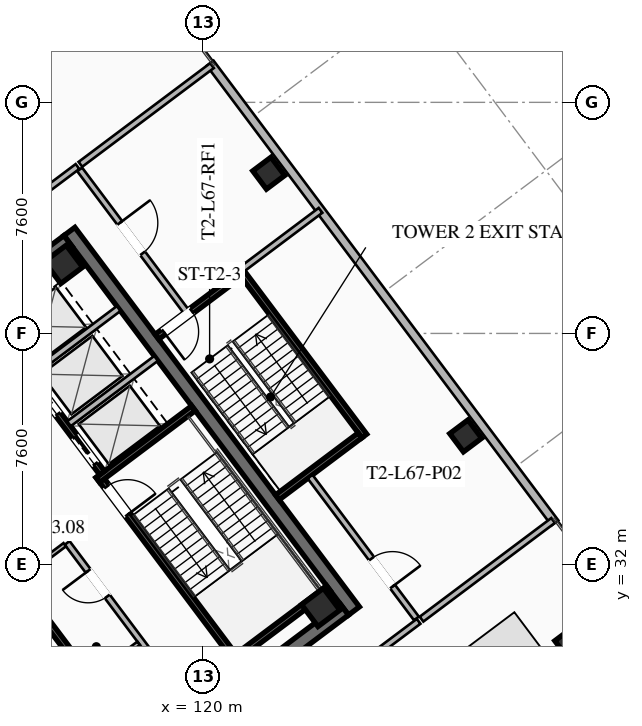
"""IFC4 building model, lengths in metres.
Left out: names, types, materials, properties, quantities, classifications, styles, units other than length and angle.
Written with IfcOpenShell. Run it as: python <this file> out.ifc"""

import sys

from ifc_helpers import new_model, si_unit, direction, frame, frame_2d, origin, origin_2d, place, context, subcontext, project, spatial, rectangle, hollow_rectangle, extrude, element, fill, save


model = new_model("IFC4")
c1 = context("Model", 3, precision=1e-05, world=origin(), true_north=direction((0.0, 1.0)))
c2 = subcontext(c1, "Body", "Model", "MODEL_VIEW")
j1 = project(units=[si_unit("LENGTHUNIT", "METRE"), si_unit("PLANEANGLEUNIT", "RADIAN")], contexts=[c1])
p1 = place(None, origin())
s1 = spatial("IfcSite", under=j1, at=p1, CompositionType="ELEMENT")
p2 = place(p1, origin())
s2 = spatial("IfcBuilding", under=s1, at=p2, CompositionType="ELEMENT")
p3 = place(p2, frame((0.0, 0.0, 246.8)))
s3 = spatial("IfcBuildingStorey", under=s2, at=p3, CompositionType="ELEMENT", Elevation=246.8)
p4 = place(p3, frame((115.604, 42.953, 0.0), z_axis=(0.0, 0.0, 1.0), x_axis=(0.600005007985, -0.799996243986, 0.0)))
e1 = element("IfcWall", 1, at=p4, inside=s3, PredefinedType="SHEAR", context=c2, shape_type="SweptSolid", body=[
    extrude(rectangle(XDim=15.6, YDim=0.45, at=frame_2d((7.8, 0.0))), origin(), (0.0, 0.0, 1.0), 4.6),
])
p5 = place(p3, frame((124.649, 30.518, 0.0), z_axis=(0.0, 0.0, 1.0), x_axis=(-0.8, -0.6, 0.0)))
e2 = element("IfcWall", 2, at=p5, inside=s3, PredefinedType="SHEAR", context=c2, shape_type="SweptSolid", body=[
    extrude(rectangle(XDim=15.26, YDim=0.45, at=frame_2d((7.63, 0.0))), origin(), (0.0, 0.0, 1.0), 4.6),
])
p6 = place(p5, frame((9.33, 0.0, 0.0)))
e3 = element("IfcOpeningElement", 3, at=p6, cuts=e2, PredefinedType="OPENING", context=c2, shape_type="SweptSolid", body=[
    extrude(rectangle(XDim=1.25, YDim=2.25, at=frame_2d((0.625, 1.125))), frame((0.0, 0.235, 0.0), z_axis=(0.0, -1.0, 0.0), x_axis=(1.0, 0.0, 0.0)), (0.0, 0.0, 1.0), 0.47),
])
p7 = place(p5, frame((4.28, 0.0, 0.0)))
e4 = element("IfcOpeningElement", 4, at=p7, cuts=e2, PredefinedType="OPENING", context=c2, shape_type="SweptSolid", body=[
    extrude(rectangle(XDim=1.25, YDim=2.25, at=frame_2d((0.625, 1.125))), frame((0.0, 0.235, 0.0), z_axis=(0.0, -1.0, 0.0), x_axis=(1.0, 0.0, 0.0)), (0.0, 0.0, 1.0), 0.47),
])
p8 = place(p3, frame((103.351, 33.482, 0.0), z_axis=(0.0, 0.0, 1.0), x_axis=(0.8, 0.6, 0.0)))
e5 = element("IfcWall", 5, at=p8, inside=s3, PredefinedType="SHEAR", context=c2, shape_type="SweptSolid", body=[
    extrude(rectangle(XDim=15.26, YDim=0.45, at=frame_2d((7.63, 0.0))), origin(), (0.0, 0.0, 1.0), 4.6),
])
p9 = place(p8, frame((4.68, 0.0, 0.0)))
e6 = element("IfcOpeningElement", 6, at=p9, cuts=e5, PredefinedType="OPENING", context=c2, shape_type="SweptSolid", body=[
    extrude(rectangle(XDim=1.25, YDim=2.25, at=frame_2d((0.625, 1.125))), frame((0.0, 0.235, 0.0), z_axis=(0.0, -1.0, 0.0), x_axis=(1.0, 0.0, 0.0)), (0.0, 0.0, 1.0), 0.47),
])
p10 = place(p8, frame((9.73, 0.0, 0.0)))
e7 = element("IfcOpeningElement", 7, at=p10, cuts=e5, PredefinedType="OPENING", context=c2, shape_type="SweptSolid", body=[
    extrude(rectangle(XDim=1.25, YDim=2.25, at=frame_2d((0.625, 1.125))), frame((0.0, 0.235, 0.0), z_axis=(0.0, -1.0, 0.0), x_axis=(1.0, 0.0, 0.0)), (0.0, 0.0, 1.0), 0.47),
])
for number, where, z_axis, x_axis in (
    (8, (123.87, 30.59, 0.0), (0.0, 0.0, 1.0), (0.8, 0.6, 0.0)),
    (9, (115.41, 41.87, 0.0), (0.0, 0.0, 1.0), (0.8, 0.6, 0.0)),
    (10, (132.2, 29.4, 0.0), (0.0, 0.0, 1.0), (0.8, 0.6, 0.0)),
):
    element("IfcColumn", number, at=place(p3, frame(where, z_axis=z_axis, x_axis=x_axis)), inside=s3, PredefinedType="COLUMN", context=c2, shape_type="SweptSolid", body=[
        extrude(hollow_rectangle(XDim=0.9, YDim=0.9, WallThickness=0.04, at=origin_2d()), origin(), (0.0, 0.0, 1.0), 4.38),
    ])
for number, where, z_axis, x_axis in (
    (11, (128.64, 36.23, 0.0), (0.0, 0.0, 1.0), (0.8, 0.6, 0.0)),
    (12, (122.16, 44.87, 0.0), (0.0, 0.0, 1.0), (0.8, 0.6, 0.0)),
):
    element("IfcColumn", number, at=place(p3, frame(where, z_axis=z_axis, x_axis=x_axis)), inside=s3, PredefinedType="COLUMN", context=c2, shape_type="SweptSolid", body=[
        extrude(hollow_rectangle(XDim=0.75, YDim=0.75, WallThickness=0.032, at=origin_2d()), origin(), (0.0, 0.0, 1.0), 4.38),
    ])
p11 = place(p3, frame((120.234, 48.488, 0.0), z_axis=(0.0, 0.0, 1.0), x_axis=(0.6, -0.8, 0.0)))
e13 = element("IfcWall", 13, at=p11, inside=s3, PredefinedType="SOLIDWALL", context=c2, shape_type="SweptSolid", body=[
    extrude(rectangle(XDim=18.9, YDim=0.28, at=frame_2d((9.45, 0.0))), origin(), (0.0, 0.0, 1.0), 4.38),
])
p12 = place(p3, frame((116.56, 34.92, 0.0), z_axis=(0.0, 0.0, 1.0), x_axis=(0.59999041401, -0.800007189403, 0.0)))
e14 = element("IfcWall", 14, at=p12, inside=s3, PredefinedType="SHEAR", context=c2, shape_type="SweptSolid", body=[
    extrude(rectangle(XDim=8.15, YDim=0.2, at=frame_2d((4.075, 0.0))), origin(), (0.0, 0.0, 1.0), 4.38),
])
p13 = place(p12, frame((0.45, 0.0, 0.0)))
e15 = element("IfcOpeningElement", 15, at=p13, cuts=e14, PredefinedType="OPENING", context=c2, shape_type="SweptSolid", body=[
    extrude(rectangle(XDim=1.15, YDim=2.2, at=frame_2d((0.575, 1.1))), frame((0.0, 0.11, 0.0), z_axis=(0.0, -1.0, 0.0), x_axis=(1.0, 0.0, 0.0)), (0.0, 0.0, 1.0), 0.22),
])
for number, where, z_axis, x_axis in (
    (16, (116.54, 34.78, 0.0), (0.0, 0.0, 1.0), (0.8, 0.6, 0.0)),
    (17, (120.98, 28.86, 0.0), (0.0, 0.0, 1.0), (0.8, 0.6, 0.0)),
):
    element("IfcWall", number, at=place(p3, frame(where, z_axis=z_axis, x_axis=x_axis)), inside=s3, PredefinedType="SHEAR", context=c2, shape_type="SweptSolid", body=[
        extrude(rectangle(XDim=3.93, YDim=0.2, at=frame_2d((1.965, 0.0))), origin(), (0.0, 0.0, 1.0), 4.38),
    ])
p14 = place(p3, frame((118.058, 25.856, 0.0), z_axis=(0.0, 0.0, 1.0), x_axis=(-0.600002657301, 0.799998007018, 0.0)))
e18 = element("IfcWall", 18, at=p14, inside=s3, PredefinedType="SHEAR", context=c2, shape_type="SweptSolid", body=[
    extrude(rectangle(XDim=14.7, YDim=0.2, at=frame_2d((7.35, 0.0))), origin(), (0.0, 0.0, 1.0), 4.38),
])
p15 = place(p3, frame((112.75, 40.25, 0.0), z_axis=(0.0, 0.0, 1.0), x_axis=(0.599994036198, -0.800004472816, 0.0)))
e19 = element("IfcWall", 19, at=p15, inside=s3, PredefinedType="SHEAR", context=c2, shape_type="SweptSolid", body=[
    extrude(rectangle(XDim=6.55, YDim=0.2, at=frame_2d((3.275, 0.0))), origin(), (0.0, 0.0, 1.0), 4.38),
])
p16 = place(p15, frame((5.075, 0.0, 0.0)))
e20 = element("IfcOpeningElement", 20, at=p16, cuts=e19, PredefinedType="OPENING", context=c2, shape_type="SweptSolid", body=[
    extrude(rectangle(XDim=1.1, YDim=2.2, at=frame_2d((0.55, 1.1))), frame((0.0, 0.11, 0.0), z_axis=(0.0, -1.0, 0.0), x_axis=(1.0, 0.0, 0.0)), (0.0, 0.0, 1.0), 0.22),
])
p17 = place(p15, frame((3.025, 0.0, 0.0)))
e21 = element("IfcOpeningElement", 21, at=p17, cuts=e19, PredefinedType="OPENING", context=c2, shape_type="SweptSolid", body=[
    extrude(rectangle(XDim=1.1, YDim=2.2, at=frame_2d((0.55, 1.1))), frame((0.0, 0.11, 0.0), z_axis=(0.0, -1.0, 0.0), x_axis=(1.0, 0.0, 0.0)), (0.0, 0.0, 1.0), 0.22),
])
p18 = place(p15, frame((1.025, 0.0, 0.0)))
e22 = element("IfcOpeningElement", 22, at=p18, cuts=e19, PredefinedType="OPENING", context=c2, shape_type="SweptSolid", body=[
    extrude(rectangle(XDim=1.1, YDim=2.2, at=frame_2d((0.55, 1.1))), frame((0.0, 0.11, 0.0), z_axis=(0.0, -1.0, 0.0), x_axis=(1.0, 0.0, 0.0)), (0.0, 0.0, 1.0), 0.22),
])
for number, where, z_axis, x_axis in (
    (23, (115.59, 36.63, 0.0), (0.0, 0.0, 1.0), (0.8, 0.6, 0.0)),
    (24, (114.36, 38.27, 0.0), (0.0, 0.0, 1.0), (0.8, 0.6, 0.0)),
):
    element("IfcWall", number, at=place(p3, frame(where, z_axis=z_axis, x_axis=x_axis)), inside=s3, PredefinedType="SOLIDWALL", context=c2, shape_type="SweptSolid", body=[
        extrude(rectangle(XDim=3.58, YDim=0.2, at=frame_2d((1.79, 0.0))), origin(), (0.0, 0.0, 1.0), 4.38),
    ])
p19 = place(p3, frame((119.73, 27.11, 0.0), z_axis=(0.0, 0.0, 1.0), x_axis=(-0.600005580459, 0.799995814625, 0.0)))
e25 = element("IfcWall", 25, at=p19, inside=s3, PredefinedType="SOLIDWALL", context=c2, shape_type="SweptSolid", body=[
    extrude(rectangle(XDim=7.0, YDim=0.2, at=frame_2d((3.5, 0.0))), origin(), (0.0, 0.0, 1.0), 3.491),
])
p20 = place(p19, frame((0.85, 0.0, 0.0)))
e26 = element("IfcOpeningElement", 26, at=p20, cuts=e25, PredefinedType="OPENING", context=c2, shape_type="SweptSolid", body=[
    extrude(rectangle(XDim=0.95, YDim=2.05, at=frame_2d((0.475, 1.025))), frame((0.0, 0.11, 0.0), z_axis=(0.0, -1.0, 0.0), x_axis=(1.0, 0.0, 0.0)), (0.0, 0.0, 1.0), 0.22),
])
p21 = place(p19, frame((4.8, 0.0, 0.0)))
e27 = element("IfcOpeningElement", 27, at=p21, cuts=e25, PredefinedType="OPENING", context=c2, shape_type="SweptSolid", body=[
    extrude(rectangle(XDim=1.05, YDim=2.2, at=frame_2d((0.525, 1.1))), frame((0.0, 0.11, 0.0), z_axis=(0.0, -1.0, 0.0), x_axis=(1.0, 0.0, 0.0)), (0.0, 0.0, 1.0), 0.22),
])
for number, where, z_axis, x_axis in (
    (28, (113.946, 31.522, 0.0), (0.0, 0.0, 1.0), (0.8, 0.6, 0.0)),
    (29, (116.376, 28.282, 0.0), (0.0, 0.0, 1.0), (0.8, 0.6, 0.0)),
):
    element("IfcWall", number, at=place(p3, frame(where, z_axis=z_axis, x_axis=x_axis)), inside=s3, PredefinedType="PARTITIONING", context=c2, shape_type="SweptSolid", body=[
        extrude(rectangle(XDim=1.88, YDim=0.135, at=frame_2d((0.94, 0.0))), origin(), (0.0, 0.0, 1.0), 3.491),
    ])
p22 = place(p3, frame((115.11, 33.27, 0.0), z_axis=(0.0, 0.0, 1.0), x_axis=(-0.600011160345, 0.79999162962, 0.0)))
e30 = element("IfcWall", 30, at=p22, inside=s3, PredefinedType="SOLIDWALL", context=c2, shape_type="SweptSolid", body=[
    extrude(rectangle(XDim=7.0, YDim=0.2, at=frame_2d((3.5, 0.0))), origin(), (0.0, 0.0, 1.0), 3.491),
])
p23 = place(p22, frame((0.85, 0.0, 0.0)))
e31 = element("IfcOpeningElement", 31, at=p23, cuts=e30, PredefinedType="OPENING", context=c2, shape_type="SweptSolid", body=[
    extrude(rectangle(XDim=0.95, YDim=2.05, at=frame_2d((0.475, 1.025))), frame((0.0, 0.11, 0.0), z_axis=(0.0, -1.0, 0.0), x_axis=(1.0, 0.0, 0.0)), (0.0, 0.0, 1.0), 0.22),
])
p24 = place(p22, frame((4.85, 0.0, 0.0)))
e32 = element("IfcOpeningElement", 32, at=p24, cuts=e30, PredefinedType="OPENING", context=c2, shape_type="SweptSolid", body=[
    extrude(rectangle(XDim=0.95, YDim=2.05, at=frame_2d((0.475, 1.025))), frame((0.0, 0.11, 0.0), z_axis=(0.0, -1.0, 0.0), x_axis=(1.0, 0.0, 0.0)), (0.0, 0.0, 1.0), 0.22),
])
p25 = place(p3, frame((113.526, 32.082, 0.0), z_axis=(0.0, 0.0, 1.0), x_axis=(0.800046745961, 0.599937666993, 0.0)))
e33 = element("IfcWall", 33, at=p25, inside=s3, PredefinedType="PARTITIONING", context=c2, shape_type="SweptSolid", body=[
    extrude(rectangle(XDim=1.88, YDim=0.135, at=frame_2d((0.94, 0.0))), origin(), (0.0, 0.0, 1.0), 3.491),
])
p26 = place(p3, frame((125.304, 36.228, 0.0), z_axis=(0.0, 0.0, 1.0), x_axis=(-0.59998851072, 0.800008616831, 0.0)))
e34 = element("IfcWall", 34, at=p26, inside=s3, PredefinedType="SHEAR", context=c2, shape_type="SweptSolid", body=[
    extrude(rectangle(XDim=6.8, YDim=0.2, at=frame_2d((3.4, 0.0))), origin(), (0.0, 0.0, 1.0), 4.38),
])
p27 = place(p3, frame((121.204, 41.528, 0.0), z_axis=(0.0, 0.0, 1.0), x_axis=(-0.800017232136, -0.599977023131, 0.0)))
e35 = element("IfcWall", 35, at=p27, inside=s3, PredefinedType="SHEAR", context=c2, shape_type="SweptSolid", body=[
    extrude(rectangle(XDim=3.4, YDim=0.2, at=frame_2d((1.7, 0.0))), origin(), (0.0, 0.0, 1.0), 4.38),
])
p28 = place(p27, frame((1.975, 0.0, 0.0)))
e36 = element("IfcOpeningElement", 36, at=p28, cuts=e35, PredefinedType="OPENING", context=c2, shape_type="SweptSolid", body=[
    extrude(rectangle(XDim=1.15, YDim=2.2, at=frame_2d((0.575, 1.1))), frame((0.0, 0.11, 0.0), z_axis=(0.0, -1.0, 0.0), x_axis=(1.0, 0.0, 0.0)), (0.0, 0.0, 1.0), 0.22),
])
p29 = place(p3, frame((122.444, 34.208, 0.0), z_axis=(0.0, 0.0, 1.0), x_axis=(0.79999138319, 0.600011488909, 0.0)))
e37 = element("IfcWall", 37, at=p29, inside=s3, PredefinedType="SHEAR", context=c2, shape_type="SweptSolid", body=[
    extrude(rectangle(XDim=3.4, YDim=0.2, at=frame_2d((1.7, 0.0))), origin(), (0.0, 0.0, 1.0), 4.38),
])
for number, where, z_axis, x_axis in (
    (38, (100.91, 33.87, 0.0), (0.0, 0.0, 1.0), (0.8, 0.6, 0.0)),
    (39, (127.09, 30.13, 0.0), (0.0, 0.0, 1.0), (-0.8, -0.6, 0.0)),
):
    element("IfcWall", number, at=place(p3, frame(where, z_axis=z_axis, x_axis=x_axis)), inside=s3, PredefinedType="SOLIDWALL", context=c2, shape_type="SweptSolid", body=[
        extrude(rectangle(XDim=18.7, YDim=0.2, at=frame_2d((9.35, 0.0))), origin(), (0.0, 0.0, 1.0), 3.491),
    ])
p30 = place(p3, frame((115.942, 44.994, 0.0), z_axis=(0.0, 0.0, 1.0), x_axis=(0.600020100987, -0.799984923866, 0.0)))
e40 = element("IfcWall", 40, at=p30, inside=s3, PredefinedType="SOLIDWALL", context=c2, shape_type="SweptSolid", body=[
    extrude(rectangle(XDim=5.83, YDim=0.2, at=frame_2d((2.915, 0.0))), origin(), (0.0, 0.0, 1.0), 3.491),
])
p31 = place(p30, frame((2.2, 0.0, 0.0)))
e41 = element("IfcOpeningElement", 41, at=p31, cuts=e40, PredefinedType="OPENING", context=c2, shape_type="SweptSolid", body=[
    extrude(rectangle(XDim=1.25, YDim=2.25, at=frame_2d((0.625, 1.125))), frame((0.0, 0.11, 0.0), z_axis=(0.0, -1.0, 0.0), x_axis=(1.0, 0.0, 0.0)), (0.0, 0.0, 1.0), 0.22),
])
p32 = place(p3, frame((123.52, 34.89, 0.0), z_axis=(0.0, 0.0, 1.0), x_axis=(0.600020100987, -0.799984923866, 0.0)))
e42 = element("IfcWall", 42, at=p32, inside=s3, PredefinedType="SOLIDWALL", context=c2, shape_type="SweptSolid", body=[
    extrude(rectangle(XDim=5.83, YDim=0.2, at=frame_2d((2.915, 0.0))), origin(), (0.0, 0.0, 1.0), 3.491),
])
p33 = place(p32, frame((3.37, 0.0, 0.0)))
e43 = element("IfcOpeningElement", 43, at=p33, cuts=e42, PredefinedType="OPENING", context=c2, shape_type="SweptSolid", body=[
    extrude(rectangle(XDim=1.15, YDim=2.2, at=frame_2d((0.575, 1.1))), frame((0.0, 0.11, 0.0), z_axis=(0.0, -1.0, 0.0), x_axis=(1.0, 0.0, 0.0)), (0.0, 0.0, 1.0), 0.22),
])
for number, where, z_axis, x_axis in (
    (44, (115.966, 45.162, 0.0), (0.0, 0.0, 1.0), (0.8, 0.6, 0.0)),
    (45, (127.186, 30.202, 0.0), (0.0, 0.0, 1.0), (0.8, 0.6, 0.0)),
):
    element("IfcWall", number, at=place(p3, frame(where, z_axis=z_axis, x_axis=x_axis)), inside=s3, PredefinedType="SOLIDWALL", context=c2, shape_type="SweptSolid", body=[
        extrude(rectangle(XDim=5.41, YDim=0.2, at=frame_2d((2.705, 0.0))), origin(), (0.0, 0.0, 1.0), 3.491),
    ])
p34 = place(p3, frame((121.304, 41.728, 0.0), z_axis=(0.0, 0.0, 1.0), x_axis=(0.800018310174, 0.599975585658, 0.0)))
e46 = element("IfcWall", 46, at=p34, inside=s3, PredefinedType="SOLIDWALL", context=c2, shape_type="SweptSolid", body=[
    extrude(rectangle(XDim=3.2, YDim=0.2, at=frame_2d((1.6, 0.0))), origin(), (0.0, 0.0, 1.0), 3.491),
])
p35 = place(p13, origin())
e47 = element("IfcDoor", 47, at=p35, inside=s3, OperationType="SINGLE_SWING_RIGHT", PredefinedType="DOOR", context=c2, shape_type="SweptSolid", body=[
    extrude(rectangle(XDim=1.15, YDim=2.2, at=frame_2d((0.575, 1.1))), frame((0.0, 0.025, 0.0), z_axis=(0.0, -1.0, 0.0), x_axis=(1.0, 0.0, 0.0)), (0.0, 0.0, 1.0), 0.05),
])
fill(e15, e47)
p36 = place(p21, origin())
e48 = element("IfcDoor", 48, at=p36, inside=s3, OperationType="SINGLE_SWING_RIGHT", PredefinedType="DOOR", context=c2, shape_type="SweptSolid", body=[
    extrude(rectangle(XDim=1.05, YDim=2.2, at=frame_2d((0.525, 1.1))), frame((0.0, 0.025, 0.0), z_axis=(0.0, -1.0, 0.0), x_axis=(1.0, 0.0, 0.0)), (0.0, 0.0, 1.0), 0.05),
])
fill(e27, e48)
p37 = place(p28, origin())
e49 = element("IfcDoor", 49, at=p37, inside=s3, OperationType="SINGLE_SWING_RIGHT", PredefinedType="DOOR", context=c2, shape_type="SweptSolid", body=[
    extrude(rectangle(XDim=1.15, YDim=2.2, at=frame_2d((0.575, 1.1))), frame((0.0, 0.025, 0.0), z_axis=(0.0, -1.0, 0.0), x_axis=(1.0, 0.0, 0.0)), (0.0, 0.0, 1.0), 0.05),
])
fill(e36, e49)
p38 = place(p31, origin())
e50 = element("IfcDoor", 50, at=p38, inside=s3, OperationType="SINGLE_SWING_LEFT", PredefinedType="DOOR", context=c2, shape_type="SweptSolid", body=[
    extrude(rectangle(XDim=1.25, YDim=2.25, at=frame_2d((0.625, 1.125))), frame((0.0, 0.025, 0.0), z_axis=(0.0, -1.0, 0.0), x_axis=(1.0, 0.0, 0.0)), (0.0, 0.0, 1.0), 0.05),
])
fill(e41, e50)
p39 = place(p33, origin())
e51 = element("IfcDoor", 51, at=p39, inside=s3, OperationType="SINGLE_SWING_RIGHT", PredefinedType="DOOR", context=c2, shape_type="SweptSolid", body=[
    extrude(rectangle(XDim=1.15, YDim=2.2, at=frame_2d((0.575, 1.1))), frame((0.0, 0.025, 0.0), z_axis=(0.0, -1.0, 0.0), x_axis=(1.0, 0.0, 0.0)), (0.0, 0.0, 1.0), 0.05),
])
fill(e43, e51)
p40 = place(p16, origin())
e52 = element("IfcDoor", 52, at=p40, inside=s3, OperationType="SLIDING_TO_LEFT", PredefinedType="DOOR", context=c2, shape_type="SweptSolid", body=[
    extrude(rectangle(XDim=1.1, YDim=2.2, at=frame_2d((0.55, 1.1))), frame((0.0, 0.025, 0.0), z_axis=(0.0, -1.0, 0.0), x_axis=(1.0, 0.0, 0.0)), (0.0, 0.0, 1.0), 0.05),
])
fill(e20, e52)
p41 = place(p17, origin())
e53 = element("IfcDoor", 53, at=p41, inside=s3, OperationType="SLIDING_TO_LEFT", PredefinedType="DOOR", context=c2, shape_type="SweptSolid", body=[
    extrude(rectangle(XDim=1.1, YDim=2.2, at=frame_2d((0.55, 1.1))), frame((0.0, 0.025, 0.0), z_axis=(0.0, -1.0, 0.0), x_axis=(1.0, 0.0, 0.0)), (0.0, 0.0, 1.0), 0.05),
])
fill(e21, e53)
save(model, sys.argv[1])
